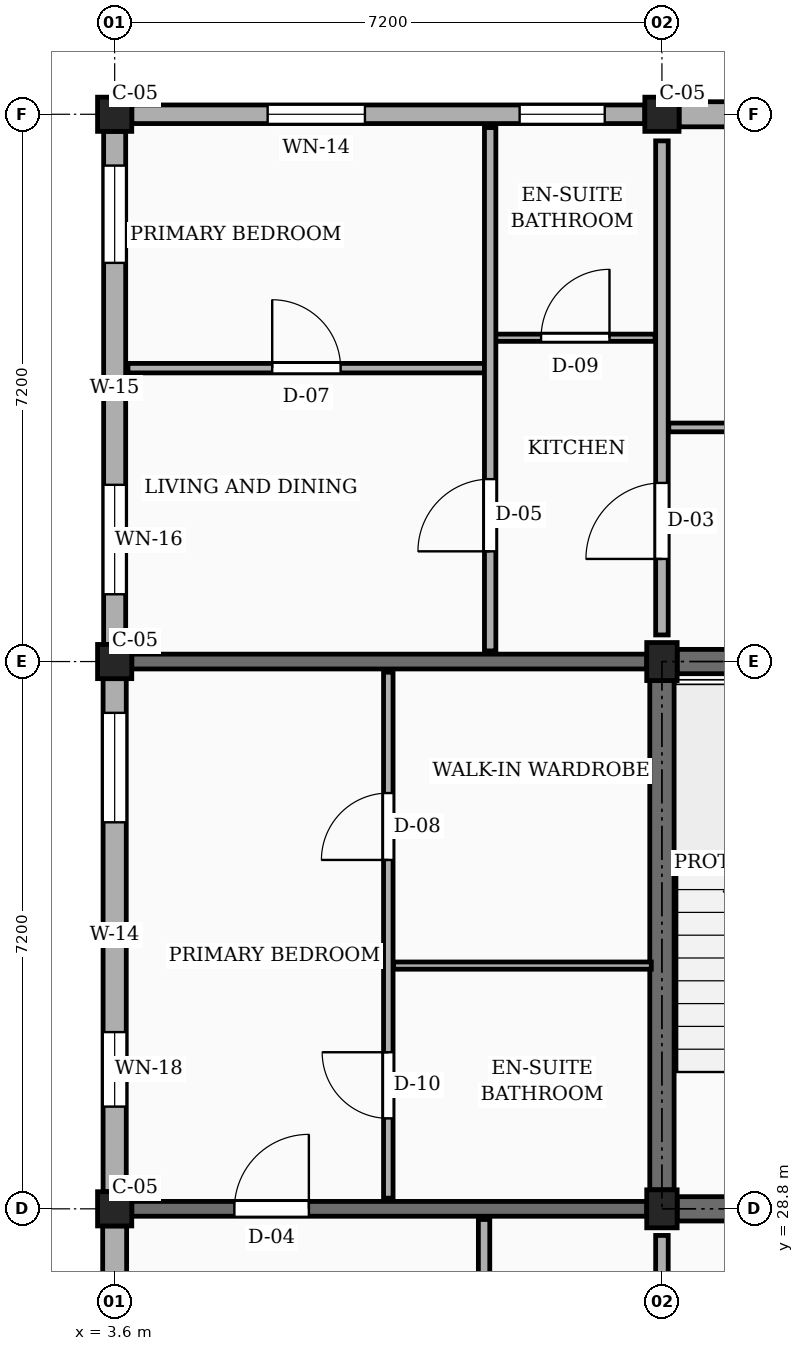
"""IFC4 building model, lengths in metres.
Left out: names, types, materials, properties, quantities, classifications, styles, units other than length and angle.
Written with IfcOpenShell. Run it as: python <this file> out.ifc"""

import sys

from ifc_helpers import new_model, si_unit, direction, frame, frame_2d, origin, origin_2d, place, context, subcontext, project, spatial, rectangle, extrude, element, fill, save


model = new_model("IFC4")
c1 = context("Model", 3, precision=1e-05, world=origin(), true_north=direction((0.0, 1.0)))
c2 = subcontext(c1, "Body", "Model", "MODEL_VIEW")
j1 = project(units=[si_unit("LENGTHUNIT", "METRE"), si_unit("PLANEANGLEUNIT", "RADIAN")], contexts=[c1])
p1 = place(None, origin())
s1 = spatial("IfcSite", under=j1, at=p1, CompositionType="ELEMENT")
p2 = place(p1, origin())
s2 = spatial("IfcBuilding", under=s1, at=p2, CompositionType="ELEMENT")
p3 = place(p2, frame((0.0, 0.0, 42.3)))
s3 = spatial("IfcBuildingStorey", under=s2, at=p3, CompositionType="ELEMENT", Elevation=42.3)
for number, where, z_axis, x_axis in (
    (1, (3.6, 28.8, 0.0), (0.0, 0.0, 1.0), (1.0, 0.0, 0.0)),
    (2, (3.6, 36.0, 0.0), (0.0, 0.0, 1.0), (1.0, 0.0, 0.0)),
    (3, (3.6, 43.2, 0.0), (0.0, 0.0, 1.0), (1.0, 0.0, 0.0)),
):
    element("IfcColumn", number, at=place(p3, frame(where, z_axis=z_axis, x_axis=x_axis)), inside=s3, PredefinedType="COLUMN", context=c2, shape_type="SweptSolid", body=[
        extrude(rectangle(XDim=0.45, YDim=0.45, at=origin_2d()), origin(), (0.0, 0.0, 1.0), 3.15),
    ])
for number, where, z_axis, x_axis in (
    (4, (10.8, 28.8, 0.0), (0.0, 0.0, 1.0), (1.0, 0.0, 0.0)),
    (5, (10.8, 36.0, 0.0), (0.0, 0.0, 1.0), (1.0, 0.0, 0.0)),
):
    element("IfcColumn", number, at=place(p3, frame(where, z_axis=z_axis, x_axis=x_axis)), inside=s3, PredefinedType="COLUMN", context=c2, shape_type="SweptSolid", body=[
        extrude(rectangle(XDim=0.4, YDim=0.5, at=origin_2d()), origin(), (0.0, 0.0, 1.0), 3.15),
    ])
p4 = place(p3, frame((10.8, 43.2, 0.0), z_axis=(0.0, 0.0, 1.0), x_axis=(1.0, 0.0, 0.0)))
e6 = element("IfcColumn", 6, at=p4, inside=s3, PredefinedType="COLUMN", context=c2, shape_type="SweptSolid", body=[
    extrude(rectangle(XDim=0.45, YDim=0.45, at=origin_2d()), origin(), (0.0, 0.0, 1.0), 3.15),
])
p5 = place(p3, frame((3.825, 28.8, 0.0), z_axis=(0.0, 0.0, 1.0), x_axis=(1.0, 0.0, 0.0)))
e7 = element("IfcWall", 7, at=p5, inside=s3, PredefinedType="SOLIDWALL", context=c2, shape_type="SweptSolid", body=[
    extrude(rectangle(XDim=6.775, YDim=0.195, at=frame_2d((3.388, 0.0))), origin(), (0.0, 0.0, 1.0), 2.17),
])
p6 = place(p5, frame((1.35, 0.0, 0.0)))
e8 = element("IfcOpeningElement", 8, at=p6, cuts=e7, PredefinedType="OPENING", context=c2, shape_type="SweptSolid", body=[
    extrude(rectangle(XDim=0.98, YDim=2.12, at=frame_2d((0.49, 1.06))), frame((0.0, 0.107, 0.0), z_axis=(0.0, -1.0, 0.0), x_axis=(1.0, 0.0, 0.0)), (0.0, 0.0, 1.0), 0.215),
])
p7 = place(p3, frame((3.825, 36.0, 0.0), z_axis=(0.0, 0.0, 1.0), x_axis=(1.0, 0.0, 0.0)))
e9 = element("IfcWall", 9, at=p7, inside=s3, PredefinedType="SOLIDWALL", context=c2, shape_type="SweptSolid", body=[
    extrude(rectangle(XDim=6.775, YDim=0.195, at=frame_2d((3.388, 0.0))), origin(), (0.0, 0.0, 1.0), 2.17),
])
p8 = place(p3, frame((17.775, 43.2, 0.0), z_axis=(0.0, 0.0, 1.0), x_axis=(-1.0, 0.0, 0.0)))
e10 = element("IfcWall", 10, at=p8, inside=s3, PredefinedType="SOLIDWALL", context=c2, shape_type="SweptSolid", body=[
    extrude(rectangle(XDim=6.75, YDim=0.33, at=frame_2d((3.375, 0.0))), origin(), (0.0, 0.0, 1.0), 2.44),
])
p9 = place(p8, frame((0.45, 0.0, 0.78)))
e11 = element("IfcOpeningElement", 11, at=p9, cuts=e10, PredefinedType="OPENING", context=c2, shape_type="SweptSolid", body=[
    extrude(rectangle(XDim=0.96, YDim=1.26, at=frame_2d((0.48, 0.63))), frame((0.0, 0.175, 0.0), z_axis=(0.0, -1.0, 0.0), x_axis=(1.0, 0.0, 0.0)), (0.0, 0.0, 1.0), 0.35),
])
p10 = place(p8, frame((4.65, 0.0, 0.78)))
e12 = element("IfcOpeningElement", 12, at=p10, cuts=e10, PredefinedType="OPENING", context=c2, shape_type="SweptSolid", body=[
    extrude(rectangle(XDim=1.12, YDim=1.26, at=frame_2d((0.56, 0.63))), frame((0.0, 0.175, 0.0), z_axis=(0.0, -1.0, 0.0), x_axis=(1.0, 0.0, 0.0)), (0.0, 0.0, 1.0), 0.35),
])
p11 = place(p3, frame((10.575, 43.2, 0.0), z_axis=(0.0, 0.0, 1.0), x_axis=(-1.0, 0.0, 0.0)))
e13 = element("IfcWall", 13, at=p11, inside=s3, PredefinedType="SOLIDWALL", context=c2, shape_type="SweptSolid", body=[
    extrude(rectangle(XDim=6.75, YDim=0.245, at=frame_2d((3.375, 0.0))), origin(), (0.0, 0.0, 1.0), 2.44),
])
p12 = place(p11, frame((0.528, 0.0, 0.78)))
e14 = element("IfcOpeningElement", 14, at=p12, cuts=e13, PredefinedType="OPENING", context=c2, shape_type="SweptSolid", body=[
    extrude(rectangle(XDim=1.12, YDim=1.26, at=frame_2d((0.56, 0.63))), frame((0.0, 0.133, 0.0), z_axis=(0.0, -1.0, 0.0), x_axis=(1.0, 0.0, 0.0)), (0.0, 0.0, 1.0), 0.265),
])
p13 = place(p11, frame((3.683, 0.0, 0.78)))
e15 = element("IfcOpeningElement", 15, at=p13, cuts=e13, PredefinedType="OPENING", context=c2, shape_type="SweptSolid", body=[
    extrude(rectangle(XDim=1.28, YDim=1.26, at=frame_2d((0.64, 0.63))), frame((0.0, 0.133, 0.0), z_axis=(0.0, -1.0, 0.0), x_axis=(1.0, 0.0, 0.0)), (0.0, 0.0, 1.0), 0.265),
])
p14 = place(p3, frame((3.6, 42.975, 0.0), z_axis=(0.0, 0.0, 1.0), x_axis=(0.0, -1.0, 0.0)))
e16 = element("IfcWall", 16, at=p14, inside=s3, PredefinedType="SOLIDWALL", context=c2, shape_type="SweptSolid", body=[
    extrude(rectangle(XDim=6.75, YDim=0.29, at=frame_2d((3.375, 0.0))), origin(), (0.0, 0.0, 1.0), 2.44),
])
p15 = place(p14, frame((0.45, 0.0, 0.78)))
e17 = element("IfcOpeningElement", 17, at=p15, cuts=e16, PredefinedType="OPENING", context=c2, shape_type="SweptSolid", body=[
    extrude(rectangle(XDim=1.28, YDim=1.26, at=frame_2d((0.64, 0.63))), frame((0.0, 0.155, 0.0), z_axis=(0.0, -1.0, 0.0), x_axis=(1.0, 0.0, 0.0)), (0.0, 0.0, 1.0), 0.31),
])
p16 = place(p14, frame((4.65, 0.0, 0.78)))
e18 = element("IfcOpeningElement", 18, at=p16, cuts=e16, PredefinedType="OPENING", context=c2, shape_type="SweptSolid", body=[
    extrude(rectangle(XDim=1.44, YDim=1.26, at=frame_2d((0.72, 0.63))), frame((0.0, 0.155, 0.0), z_axis=(0.0, -1.0, 0.0), x_axis=(1.0, 0.0, 0.0)), (0.0, 0.0, 1.0), 0.31),
])
p17 = place(p3, frame((3.6, 35.775, 0.0), z_axis=(0.0, 0.0, 1.0), x_axis=(0.0, -1.0, 0.0)))
e19 = element("IfcWall", 19, at=p17, inside=s3, PredefinedType="SOLIDWALL", context=c2, shape_type="SweptSolid", body=[
    extrude(rectangle(XDim=6.75, YDim=0.305, at=frame_2d((3.375, 0.0))), origin(), (0.0, 0.0, 1.0), 2.44),
])
p18 = place(p17, frame((0.45, 0.0, 0.78)))
e20 = element("IfcOpeningElement", 20, at=p18, cuts=e19, PredefinedType="OPENING", context=c2, shape_type="SweptSolid", body=[
    extrude(rectangle(XDim=1.44, YDim=1.26, at=frame_2d((0.72, 0.63))), frame((0.0, 0.163, 0.0), z_axis=(0.0, -1.0, 0.0), x_axis=(1.0, 0.0, 0.0)), (0.0, 0.0, 1.0), 0.325),
])
p19 = place(p17, frame((4.65, 0.0, 0.78)))
e21 = element("IfcOpeningElement", 21, at=p19, cuts=e19, PredefinedType="OPENING", context=c2, shape_type="SweptSolid", body=[
    extrude(rectangle(XDim=0.98, YDim=1.36, at=frame_2d((0.49, 0.68))), frame((0.0, 0.163, 0.0), z_axis=(0.0, -1.0, 0.0), x_axis=(1.0, 0.0, 0.0)), (0.0, 0.0, 1.0), 0.325),
])
p20 = place(p3, frame((3.6, 28.575, 0.0), z_axis=(0.0, 0.0, 1.0), x_axis=(0.0, -1.0, 0.0)))
e22 = element("IfcWall", 22, at=p20, inside=s3, PredefinedType="SOLIDWALL", context=c2, shape_type="SweptSolid", body=[
    extrude(rectangle(XDim=3.955, YDim=0.315, at=frame_2d((1.978, 0.0))), origin(), (0.0, 0.0, 1.0), 2.44),
])
p21 = place(p20, frame((1.062, 0.0, 0.78)))
e23 = element("IfcOpeningElement", 23, at=p21, cuts=e22, PredefinedType="OPENING", context=c2, shape_type="SweptSolid", body=[
    extrude(rectangle(XDim=0.98, YDim=1.36, at=frame_2d((0.49, 0.68))), frame((0.0, 0.167, 0.0), z_axis=(0.0, -1.0, 0.0), x_axis=(1.0, 0.0, 0.0)), (0.0, 0.0, 1.0), 0.335),
])
p22 = place(p3, frame((10.8, 29.05, 0.0), z_axis=(0.0, 0.0, 1.0), x_axis=(0.0, 1.0, 0.0)))
e24 = element("IfcWall", 24, at=p22, inside=s3, PredefinedType="SHEAR", context=c2, shape_type="SweptSolid", body=[
    extrude(rectangle(XDim=6.7, YDim=0.32, at=frame_2d((3.35, 0.0))), origin(), (0.0, 0.0, 1.0), 2.87),
])
for number, where, z_axis, x_axis in (
    (25, (11.0, 36.0, 0.0), (0.0, 0.0, 1.0), (1.0, 0.0, 0.0)),
    (26, (11.0, 28.8, 0.0), (0.0, 0.0, 1.0), (1.0, 0.0, 0.0)),
):
    element("IfcWall", number, at=place(p3, frame(where, z_axis=z_axis, x_axis=x_axis)), inside=s3, PredefinedType="SHEAR", context=c2, shape_type="SweptSolid", body=[
        extrude(rectangle(XDim=6.8, YDim=0.32, at=frame_2d((3.4, 0.0))), origin(), (0.0, 0.0, 1.0), 2.87),
    ])
p23 = place(p3, frame((10.8, 21.95, 0.0), z_axis=(0.0, 0.0, 1.0), x_axis=(0.0, 1.0, 0.0)))
e27 = element("IfcWall", 27, at=p23, inside=s3, PredefinedType="PARTITIONING", context=c2, shape_type="SweptSolid", body=[
    extrude(rectangle(XDim=6.5, YDim=0.165, at=frame_2d((3.25, 0.0))), origin(), (0.0, 0.0, 1.0), 2.305),
])
p24 = place(p23, frame((1.0, 0.0, 0.0)))
e28 = element("IfcOpeningElement", 28, at=p24, cuts=e27, PredefinedType="OPENING", context=c2, shape_type="SweptSolid", body=[
    extrude(rectangle(XDim=1.14, YDim=2.18, at=frame_2d((0.57, 1.09))), frame((0.0, 0.093, 0.0), z_axis=(0.0, -1.0, 0.0), x_axis=(1.0, 0.0, 0.0)), (0.0, 0.0, 1.0), 0.185),
])
p25 = place(p3, frame((10.8, 36.35, 0.0), z_axis=(0.0, 0.0, 1.0), x_axis=(0.0, 1.0, 0.0)))
e29 = element("IfcWall", 29, at=p25, inside=s3, PredefinedType="PARTITIONING", context=c2, shape_type="SweptSolid", body=[
    extrude(rectangle(XDim=6.5, YDim=0.165, at=frame_2d((3.25, 0.0))), origin(), (0.0, 0.0, 1.0), 2.305),
])
p26 = place(p25, frame((1.0, 0.0, 0.0)))
e30 = element("IfcOpeningElement", 30, at=p26, cuts=e29, PredefinedType="OPENING", context=c2, shape_type="SweptSolid", body=[
    extrude(rectangle(XDim=1.0, YDim=2.15, at=frame_2d((0.5, 1.075))), frame((0.0, 0.093, 0.0), z_axis=(0.0, -1.0, 0.0), x_axis=(1.0, 0.0, 0.0)), (0.0, 0.0, 1.0), 0.185),
])
p27 = place(p3, frame((8.46, 21.74, 0.0), z_axis=(0.0, 0.0, 1.0), x_axis=(0.0, 1.0, 0.0)))
e31 = element("IfcWall", 31, at=p27, inside=s3, PredefinedType="PARTITIONING", context=c2, shape_type="SweptSolid", body=[
    extrude(rectangle(XDim=6.92, YDim=0.15, at=frame_2d((3.46, 0.0))), origin(), (0.0, 0.0, 1.0), 2.305),
])
p28 = place(p27, frame((1.31, 0.0, 0.0)))
e32 = element("IfcOpeningElement", 32, at=p28, cuts=e31, PredefinedType="OPENING", context=c2, shape_type="SweptSolid", body=[
    extrude(rectangle(XDim=0.92, YDim=2.1, at=frame_2d((0.46, 1.05))), frame((0.0, 0.085, 0.0), z_axis=(0.0, -1.0, 0.0), x_axis=(1.0, 0.0, 0.0)), (0.0, 0.0, 1.0), 0.17),
])
p29 = place(p3, frame((7.2, 28.94, 0.0), z_axis=(0.0, 0.0, 1.0), x_axis=(0.0, 1.0, 0.0)))
e33 = element("IfcWall", 33, at=p29, inside=s3, PredefinedType="PARTITIONING", context=c2, shape_type="SweptSolid", body=[
    extrude(rectangle(XDim=6.92, YDim=0.125, at=frame_2d((3.46, 0.0))), origin(), (0.0, 0.0, 1.0), 2.305),
])
p30 = place(p29, frame((1.05, 0.0, 0.0)))
e34 = element("IfcOpeningElement", 34, at=p30, cuts=e33, PredefinedType="OPENING", context=c2, shape_type="SweptSolid", body=[
    extrude(rectangle(XDim=0.87, YDim=2.05, at=frame_2d((0.435, 1.025))), frame((0.0, 0.073, 0.0), z_axis=(0.0, -1.0, 0.0), x_axis=(1.0, 0.0, 0.0)), (0.0, 0.0, 1.0), 0.145),
])
p31 = place(p29, frame((4.45, 0.0, 0.0)))
e35 = element("IfcOpeningElement", 35, at=p31, cuts=e33, PredefinedType="OPENING", context=c2, shape_type="SweptSolid", body=[
    extrude(rectangle(XDim=0.88, YDim=2.08, at=frame_2d((0.44, 1.04))), frame((0.0, 0.073, 0.0), z_axis=(0.0, -1.0, 0.0), x_axis=(1.0, 0.0, 0.0)), (0.0, 0.0, 1.0), 0.145),
])
p32 = place(p3, frame((7.27, 32.0, 0.0), z_axis=(0.0, 0.0, 1.0), x_axis=(1.0, 0.0, 0.0)))
e36 = element("IfcWall", 36, at=p32, inside=s3, PredefinedType="PARTITIONING", context=c2, shape_type="SweptSolid", body=[
    extrude(rectangle(XDim=3.39, YDim=0.095, at=frame_2d((1.695, 0.0))), origin(), (0.0, 0.0, 1.0), 2.305),
])
p33 = place(p3, frame((10.89, 39.08, 0.0), z_axis=(0.0, 0.0, 1.0), x_axis=(1.0, 0.0, 0.0)))
e37 = element("IfcWall", 37, at=p33, inside=s3, PredefinedType="PARTITIONING", context=c2, shape_type="SweptSolid", body=[
    extrude(rectangle(XDim=7.02, YDim=0.115, at=frame_2d((3.51, 0.0))), origin(), (0.0, 0.0, 1.0), 2.305),
])
p34 = place(p33, frame((2.85, 0.0, 0.0)))
e38 = element("IfcOpeningElement", 38, at=p34, cuts=e37, PredefinedType="OPENING", context=c2, shape_type="SweptSolid", body=[
    extrude(rectangle(XDim=1.02, YDim=2.15, at=frame_2d((0.51, 1.075))), frame((0.0, 0.067, 0.0), z_axis=(0.0, -1.0, 0.0), x_axis=(1.0, 0.0, 0.0)), (0.0, 0.0, 1.0), 0.135),
])
p35 = place(p3, frame((3.775, 39.86, 0.0), z_axis=(0.0, 0.0, 1.0), x_axis=(1.0, 0.0, 0.0)))
e39 = element("IfcWall", 39, at=p35, inside=s3, PredefinedType="PARTITIONING", context=c2, shape_type="SweptSolid", body=[
    extrude(rectangle(XDim=4.695, YDim=0.125, at=frame_2d((2.348, 0.0))), origin(), (0.0, 0.0, 1.0), 2.305),
])
p36 = place(p35, frame((1.897, 0.0, 0.0)))
e40 = element("IfcOpeningElement", 40, at=p36, cuts=e39, PredefinedType="OPENING", context=c2, shape_type="SweptSolid", body=[
    extrude(rectangle(XDim=0.9, YDim=2.1, at=frame_2d((0.45, 1.05))), frame((0.0, 0.073, 0.0), z_axis=(0.0, -1.0, 0.0), x_axis=(1.0, 0.0, 0.0)), (0.0, 0.0, 1.0), 0.145),
])
p37 = place(p3, frame((8.61, 40.26, 0.0), z_axis=(0.0, 0.0, 1.0), x_axis=(1.0, 0.0, 0.0)))
e41 = element("IfcWall", 41, at=p37, inside=s3, PredefinedType="PARTITIONING", context=c2, shape_type="SweptSolid", body=[
    extrude(rectangle(XDim=2.1, YDim=0.095, at=frame_2d((1.05, 0.0))), origin(), (0.0, 0.0, 1.0), 2.305),
])
p38 = place(p37, frame((0.6, 0.0, 0.0)))
e42 = element("IfcOpeningElement", 42, at=p38, cuts=e41, PredefinedType="OPENING", context=c2, shape_type="SweptSolid", body=[
    extrude(rectangle(XDim=0.9, YDim=2.05, at=frame_2d((0.45, 1.025))), frame((0.0, 0.058, 0.0), z_axis=(0.0, -1.0, 0.0), x_axis=(1.0, 0.0, 0.0)), (0.0, 0.0, 1.0), 0.115),
])
p39 = place(p3, frame((8.54, 36.14, 0.0), z_axis=(0.0, 0.0, 1.0), x_axis=(0.0, 1.0, 0.0)))
e43 = element("IfcWall", 43, at=p39, inside=s3, PredefinedType="PARTITIONING", context=c2, shape_type="SweptSolid", body=[
    extrude(rectangle(XDim=6.885, YDim=0.15, at=frame_2d((3.442, 0.0))), origin(), (0.0, 0.0, 1.0), 2.305),
])
p40 = place(p39, frame((1.31, 0.0, 0.0)))
e44 = element("IfcOpeningElement", 44, at=p40, cuts=e43, PredefinedType="OPENING", context=c2, shape_type="SweptSolid", body=[
    extrude(rectangle(XDim=0.95, YDim=2.1, at=frame_2d((0.475, 1.05))), frame((0.0, 0.085, 0.0), z_axis=(0.0, -1.0, 0.0), x_axis=(1.0, 0.0, 0.0)), (0.0, 0.0, 1.0), 0.17),
])
p41 = place(p12, origin())
e45 = element("IfcWindow", 45, at=p41, inside=s3, PartitioningType="SINGLE_PANEL", PredefinedType="WINDOW", context=c2, shape_type="SweptSolid", body=[
    extrude(rectangle(XDim=1.12, YDim=1.26, at=frame_2d((0.56, 0.63))), frame((0.0, 0.03, 0.0), z_axis=(0.0, -1.0, 0.0), x_axis=(1.0, 0.0, 0.0)), (0.0, 0.0, 1.0), 0.06),
])
fill(e14, e45)
p42 = place(p13, origin())
e46 = element("IfcWindow", 46, at=p42, inside=s3, PartitioningType="SINGLE_PANEL", PredefinedType="WINDOW", context=c2, shape_type="SweptSolid", body=[
    extrude(rectangle(XDim=1.28, YDim=1.26, at=frame_2d((0.64, 0.63))), frame((0.0, 0.03, 0.0), z_axis=(0.0, -1.0, 0.0), x_axis=(1.0, 0.0, 0.0)), (0.0, 0.0, 1.0), 0.06),
])
fill(e15, e46)
p43 = place(p15, origin())
e47 = element("IfcWindow", 47, at=p43, inside=s3, PartitioningType="SINGLE_PANEL", PredefinedType="WINDOW", context=c2, shape_type="SweptSolid", body=[
    extrude(rectangle(XDim=1.28, YDim=1.26, at=frame_2d((0.64, 0.63))), frame((0.0, 0.03, 0.0), z_axis=(0.0, -1.0, 0.0), x_axis=(1.0, 0.0, 0.0)), (0.0, 0.0, 1.0), 0.06),
])
fill(e17, e47)
p44 = place(p16, origin())
e48 = element("IfcWindow", 48, at=p44, inside=s3, PartitioningType="SINGLE_PANEL", PredefinedType="WINDOW", context=c2, shape_type="SweptSolid", body=[
    extrude(rectangle(XDim=1.44, YDim=1.26, at=frame_2d((0.72, 0.63))), frame((0.0, 0.03, 0.0), z_axis=(0.0, -1.0, 0.0), x_axis=(1.0, 0.0, 0.0)), (0.0, 0.0, 1.0), 0.06),
])
fill(e18, e48)
p45 = place(p18, origin())
e49 = element("IfcWindow", 49, at=p45, inside=s3, PartitioningType="SINGLE_PANEL", PredefinedType="WINDOW", context=c2, shape_type="SweptSolid", body=[
    extrude(rectangle(XDim=1.44, YDim=1.26, at=frame_2d((0.72, 0.63))), frame((0.0, 0.03, 0.0), z_axis=(0.0, -1.0, 0.0), x_axis=(1.0, 0.0, 0.0)), (0.0, 0.0, 1.0), 0.06),
])
fill(e20, e49)
p46 = place(p19, origin())
e50 = element("IfcWindow", 50, at=p46, inside=s3, PartitioningType="SINGLE_PANEL", PredefinedType="WINDOW", context=c2, shape_type="SweptSolid", body=[
    extrude(rectangle(XDim=0.98, YDim=1.36, at=frame_2d((0.49, 0.68))), frame((0.0, 0.03, 0.0), z_axis=(0.0, -1.0, 0.0), x_axis=(1.0, 0.0, 0.0)), (0.0, 0.0, 1.0), 0.06),
])
fill(e21, e50)
p47 = place(p26, origin())
e51 = element("IfcDoor", 51, at=p47, inside=s3, OperationType="SINGLE_SWING_LEFT", PredefinedType="DOOR", context=c2, shape_type="SweptSolid", body=[
    extrude(rectangle(XDim=1.0, YDim=2.15, at=frame_2d((0.5, 1.075))), frame((0.0, 0.025, 0.0), z_axis=(0.0, -1.0, 0.0), x_axis=(1.0, 0.0, 0.0)), (0.0, 0.0, 1.0), 0.05),
])
fill(e30, e51)
p48 = place(p30, origin())
e52 = element("IfcDoor", 52, at=p48, inside=s3, OperationType="SINGLE_SWING_RIGHT", PredefinedType="DOOR", context=c2, shape_type="SweptSolid", body=[
    extrude(rectangle(XDim=0.87, YDim=2.05, at=frame_2d((0.435, 1.025))), frame((0.0, 0.025, 0.0), z_axis=(0.0, -1.0, 0.0), x_axis=(1.0, 0.0, 0.0)), (0.0, 0.0, 1.0), 0.05),
])
fill(e34, e52)
p49 = place(p31, origin())
e53 = element("IfcDoor", 53, at=p49, inside=s3, OperationType="SINGLE_SWING_LEFT", PredefinedType="DOOR", context=c2, shape_type="SweptSolid", body=[
    extrude(rectangle(XDim=0.88, YDim=2.08, at=frame_2d((0.44, 1.04))), frame((0.0, 0.025, 0.0), z_axis=(0.0, -1.0, 0.0), x_axis=(1.0, 0.0, 0.0)), (0.0, 0.0, 1.0), 0.05),
])
fill(e35, e53)
p50 = place(p36, origin())
e54 = element("IfcDoor", 54, at=p50, inside=s3, OperationType="SINGLE_SWING_LEFT", PredefinedType="DOOR", context=c2, shape_type="SweptSolid", body=[
    extrude(rectangle(XDim=0.9, YDim=2.1, at=frame_2d((0.45, 1.05))), frame((0.0, 0.025, 0.0), z_axis=(0.0, -1.0, 0.0), x_axis=(1.0, 0.0, 0.0)), (0.0, 0.0, 1.0), 0.05),
])
fill(e40, e54)
p51 = place(p38, origin())
e55 = element("IfcDoor", 55, at=p51, inside=s3, OperationType="SINGLE_SWING_RIGHT", PredefinedType="DOOR", context=c2, shape_type="SweptSolid", body=[
    extrude(rectangle(XDim=0.9, YDim=2.05, at=frame_2d((0.45, 1.025))), frame((0.0, 0.025, 0.0), z_axis=(0.0, -1.0, 0.0), x_axis=(1.0, 0.0, 0.0)), (0.0, 0.0, 1.0), 0.05),
])
fill(e42, e55)
p52 = place(p40, origin())
e56 = element("IfcDoor", 56, at=p52, inside=s3, OperationType="SINGLE_SWING_LEFT", PredefinedType="DOOR", context=c2, shape_type="SweptSolid", body=[
    extrude(rectangle(XDim=0.95, YDim=2.1, at=frame_2d((0.475, 1.05))), frame((0.0, 0.025, 0.0), z_axis=(0.0, -1.0, 0.0), x_axis=(1.0, 0.0, 0.0)), (0.0, 0.0, 1.0), 0.05),
])
fill(e44, e56)
p53 = place(p6, origin())
e57 = element("IfcDoor", 57, at=p53, inside=s3, OperationType="SINGLE_SWING_RIGHT", PredefinedType="DOOR", context=c2, shape_type="SweptSolid", body=[
    extrude(rectangle(XDim=0.98, YDim=2.12, at=frame_2d((0.49, 1.06))), frame((0.0, 0.025, 0.0), z_axis=(0.0, -1.0, 0.0), x_axis=(1.0, 0.0, 0.0)), (0.0, 0.0, 1.0), 0.05),
])
fill(e8, e57)
save(model, sys.argv[1])
